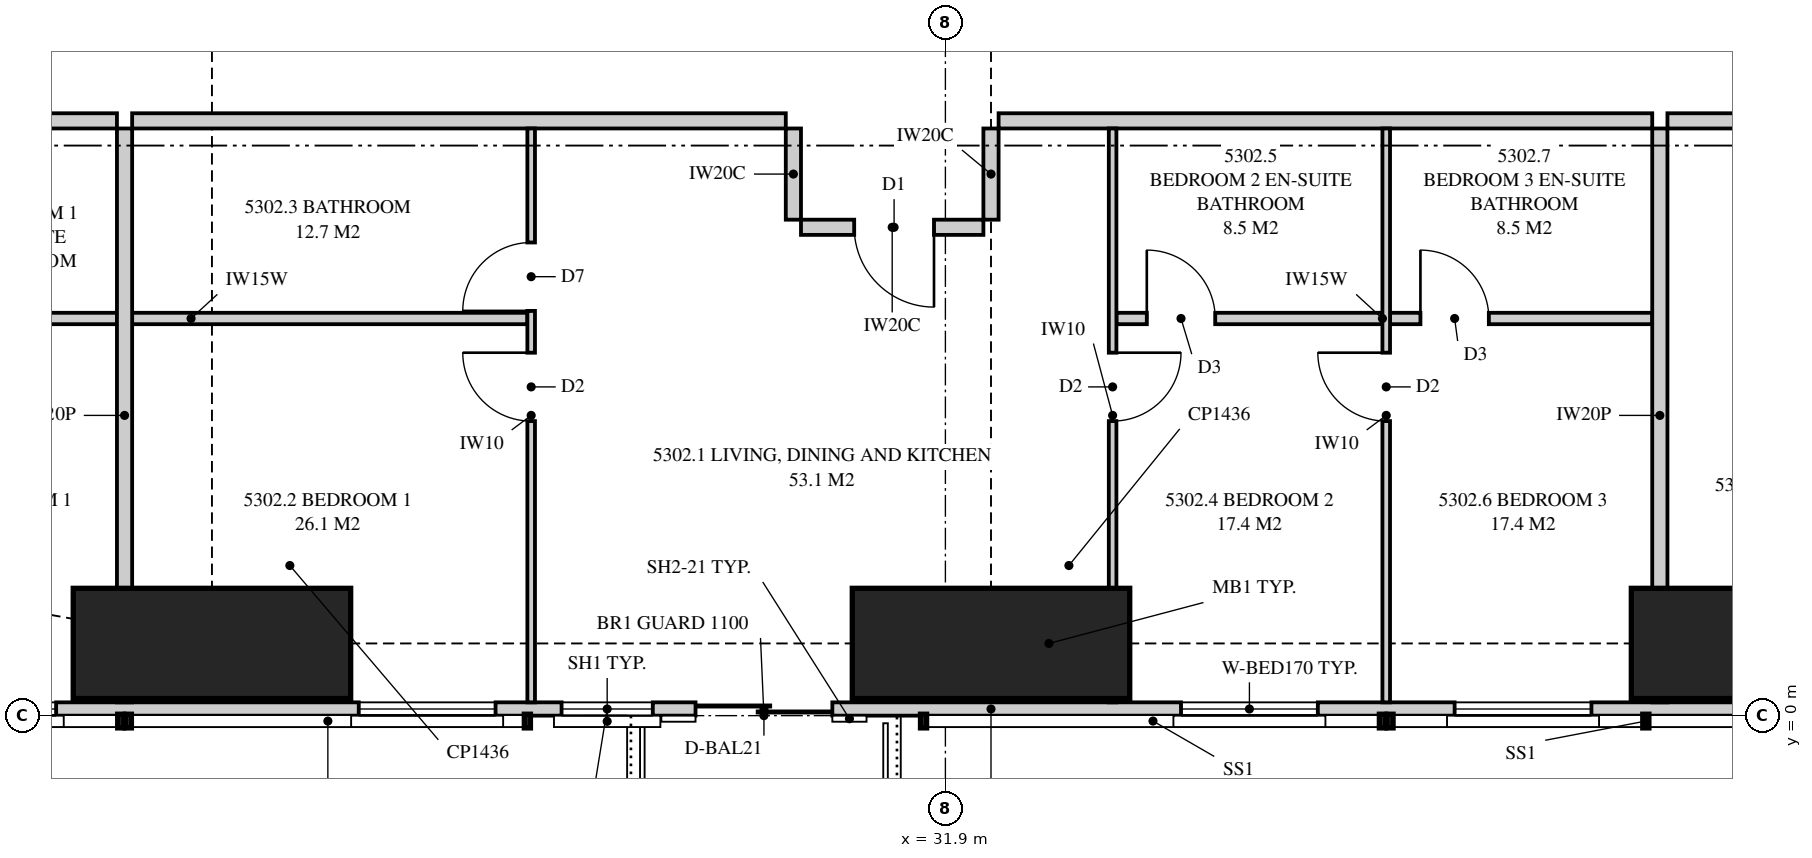
"""IFC4 building model, lengths in metres.
Left out: names, types, materials, properties, quantities, classifications, styles, units other than length and angle.
Written with IfcOpenShell. Run it as: python <this file> out.ifc"""

import sys

from ifc_helpers import new_model, si_unit, direction, frame, frame_2d, origin, origin_2d, place, context, subcontext, project, spatial, polyline, rectangle, outline, extrude, element, fill, save


model = new_model("IFC4")
c1 = context("Model", 3, precision=1e-05, world=origin(), true_north=direction((0.0, 1.0)))
c2 = subcontext(c1, "Body", "Model", "MODEL_VIEW")
j1 = project(units=[si_unit("LENGTHUNIT", "METRE"), si_unit("PLANEANGLEUNIT", "RADIAN")], contexts=[c1])
p1 = place(None, origin())
s1 = spatial("IfcSite", under=j1, at=p1, CompositionType="ELEMENT")
p2 = place(p1, origin())
s2 = spatial("IfcBuilding", under=s1, at=p2, CompositionType="ELEMENT")
p3 = place(p2, frame((0.0, 0.0, 194.55)))
s3 = spatial("IfcBuildingStorey", under=s2, at=p3, CompositionType="ELEMENT", Elevation=194.55)
for number, where, z_axis, x_axis in (
    (1, (22.25, 0.95, 0.0), (0.0, 0.0, 1.0), (0.0, 1.0, 0.0)),
    (2, (32.5, 0.95, 0.0), (0.0, 0.0, 1.0), (0.0, 1.0, 0.0)),
    (3, (42.75, 0.95, 0.0), (0.0, 0.0, 1.0), (0.0, 1.0, 0.0)),
):
    element("IfcColumn", number, at=place(p3, frame(where, z_axis=z_axis, x_axis=x_axis)), inside=s3, PredefinedType="COLUMN", context=c2, shape_type="SweptSolid", body=[
        extrude(rectangle(XDim=1.45, YDim=3.65, at=origin_2d()), origin(), (0.0, 0.0, 1.0), 3.35),
    ])
p4 = place(p3, frame((15.051, 0.087, 0.0), z_axis=(0.0, 0.0, 1.0), x_axis=(1.0, 0.0, 0.0)))
e4 = element("IfcWall", 4, at=p4, inside=s3, PredefinedType="SOLIDWALL", context=c2, shape_type="SweptSolid", body=[
    extrude(outline(polyline([(0.0, 0.0), (34.897, 0.0), (34.897, 3.11), (27.91, 3.11), (27.91, 2.15), (27.836, 2.15), (27.836, 3.11), (27.699, 3.11), (27.699, 2.15), (7.199, 2.15), (7.199, 3.11), (7.062, 3.11), (7.062, 2.15), (6.987, 2.15), (6.987, 3.11), (0.0, 3.11), (0.0, 0.0)])), frame((0.0, 0.087, 0.0), z_axis=(0.0, -1.0, 0.0), x_axis=(1.0, 0.0, 0.0)), (0.0, 0.0, 1.0), 0.175),
])
p5 = place(p4, frame((0.613, 0.0, 0.4)))
e5 = element("IfcOpeningElement", 5, at=p5, cuts=e4, PredefinedType="OPENING", context=c2, shape_type="SweptSolid", body=[
    extrude(rectangle(XDim=1.2, YDim=1.7, at=frame_2d((0.6, 0.85))), frame((0.0, 0.097, 0.0), z_axis=(0.0, -1.0, 0.0), x_axis=(1.0, 0.0, 0.0)), (0.0, 0.0, 1.0), 0.195),
])
p6 = place(p4, frame((3.349, 0.0, 0.4)))
e6 = element("IfcOpeningElement", 6, at=p6, cuts=e4, PredefinedType="OPENING", context=c2, shape_type="SweptSolid", body=[
    extrude(rectangle(XDim=1.8, YDim=1.7, at=frame_2d((0.9, 0.85))), frame((0.0, 0.097, 0.0), z_axis=(0.0, -1.0, 0.0), x_axis=(1.0, 0.0, 0.0)), (0.0, 0.0, 1.0), 0.195),
])
p7 = place(p4, frame((9.13, 0.0, 0.4)))
e7 = element("IfcOpeningElement", 7, at=p7, cuts=e4, PredefinedType="OPENING", context=c2, shape_type="SweptSolid", body=[
    extrude(rectangle(XDim=1.8, YDim=1.7, at=frame_2d((0.9, 0.85))), frame((0.0, 0.097, 0.0), z_axis=(0.0, -1.0, 0.0), x_axis=(1.0, 0.0, 0.0)), (0.0, 0.0, 1.0), 0.195),
])
p8 = place(p4, frame((13.561, 0.0, 0.0)))
e8 = element("IfcOpeningElement", 8, at=p8, cuts=e4, PredefinedType="OPENING", context=c2, shape_type="SweptSolid", body=[
    extrude(rectangle(XDim=1.8, YDim=2.1, at=frame_2d((0.9, 1.05))), frame((0.0, 0.097, 0.0), z_axis=(0.0, -1.0, 0.0), x_axis=(1.0, 0.0, 0.0)), (0.0, 0.0, 1.0), 0.195),
])
p9 = place(p4, frame((11.799, 0.0, 0.4)))
e9 = element("IfcOpeningElement", 9, at=p9, cuts=e4, PredefinedType="OPENING", context=c2, shape_type="SweptSolid", body=[
    extrude(rectangle(XDim=1.2, YDim=1.7, at=frame_2d((0.6, 0.85))), frame((0.0, 0.097, 0.0), z_axis=(0.0, -1.0, 0.0), x_axis=(1.0, 0.0, 0.0)), (0.0, 0.0, 1.0), 0.195),
])
p10 = place(p4, frame((19.949, 0.0, 0.4)))
e10 = element("IfcOpeningElement", 10, at=p10, cuts=e4, PredefinedType="OPENING", context=c2, shape_type="SweptSolid", body=[
    extrude(rectangle(XDim=1.8, YDim=1.7, at=frame_2d((0.9, 0.85))), frame((0.0, 0.097, 0.0), z_axis=(0.0, -1.0, 0.0), x_axis=(1.0, 0.0, 0.0)), (0.0, 0.0, 1.0), 0.195),
])
p11 = place(p4, frame((23.549, 0.0, 0.4)))
e11 = element("IfcOpeningElement", 11, at=p11, cuts=e4, PredefinedType="OPENING", context=c2, shape_type="SweptSolid", body=[
    extrude(rectangle(XDim=1.8, YDim=1.7, at=frame_2d((0.9, 0.85))), frame((0.0, 0.097, 0.0), z_axis=(0.0, -1.0, 0.0), x_axis=(1.0, 0.0, 0.0)), (0.0, 0.0, 1.0), 0.195),
])
p12 = place(p4, frame((29.73, 0.0, 0.4)))
e12 = element("IfcOpeningElement", 12, at=p12, cuts=e4, PredefinedType="OPENING", context=c2, shape_type="SweptSolid", body=[
    extrude(rectangle(XDim=2.4, YDim=1.7, at=frame_2d((1.2, 0.85))), frame((0.0, 0.097, 0.0), z_axis=(0.0, -1.0, 0.0), x_axis=(1.0, 0.0, 0.0)), (0.0, 0.0, 1.0), 0.195),
])
p13 = place(p3, frame((21.1, 0.175, 0.0), z_axis=(0.0, 0.0, 1.0), x_axis=(0.0, 1.0, 0.0)))
e13 = element("IfcWall", 13, at=p13, inside=s3, PredefinedType="PARTITIONING", context=c2, shape_type="SweptSolid", body=[
    extrude(outline(polyline([(0.054, 3.11), (0.0, 3.11), (0.0, 0.0), (0.529, 0.0), (0.529, 0.362), (1.021, 0.362), (1.021, 0.0), (7.55, 0.0), (7.55, 3.11), (1.903, 3.11), (1.903, 2.15), (1.021, 2.15), (1.021, 1.788), (0.529, 1.788), (0.529, 2.15), (0.054, 2.15), (0.054, 3.11)])), frame((0.0, 0.1, 0.0), z_axis=(0.0, -1.0, 0.0), x_axis=(1.0, 0.0, 0.0)), (0.0, 0.0, 1.0), 0.2),
])
p14 = place(p3, frame((17.85, 7.825, 0.0), z_axis=(0.0, 0.0, 1.0), x_axis=(1.0, 0.0, 0.0)))
e14 = element("IfcWall", 14, at=p14, inside=s3, PredefinedType="PARTITIONING", context=c2, shape_type="SweptSolid", body=[
    extrude(rectangle(XDim=3.15, YDim=0.2, at=frame_2d((1.575, 0.0))), origin(), (0.0, 0.0, 1.0), 3.11),
])
p15 = place(p14, frame((0.2, 0.0, 0.0)))
e15 = element("IfcOpeningElement", 15, at=p15, cuts=e14, PredefinedType="OPENING", context=c2, shape_type="SweptSolid", body=[
    extrude(rectangle(XDim=1.05, YDim=2.2, at=frame_2d((0.525, 1.1))), frame((0.0, 0.11, 0.0), z_axis=(0.0, -1.0, 0.0), x_axis=(1.0, 0.0, 0.0)), (0.0, 0.0, 1.0), 0.22),
])
p16 = place(p3, frame((17.55, 5.225, 0.0), z_axis=(0.0, 0.0, 1.0), x_axis=(1.0, 0.0, 0.0)))
e16 = element("IfcWall", 16, at=p16, inside=s3, PredefinedType="PLUMBINGWALL", context=c2, shape_type="SweptSolid", body=[
    extrude(rectangle(XDim=3.45, YDim=0.15, at=frame_2d((1.725, 0.0))), origin(), (0.0, 0.0, 1.0), 3.11),
])
p17 = place(p16, frame((0.4, 0.0, 0.0)))
e17 = element("IfcOpeningElement", 17, at=p17, cuts=e16, PredefinedType="OPENING", context=c2, shape_type="SweptSolid", body=[
    extrude(rectangle(XDim=0.9, YDim=2.1, at=frame_2d((0.45, 1.05))), frame((0.0, 0.085, 0.0), z_axis=(0.0, -1.0, 0.0), x_axis=(1.0, 0.0, 0.0)), (0.0, 0.0, 1.0), 0.17),
])
p18 = place(p3, frame((41.3, 0.175, 0.0), z_axis=(0.0, 0.0, 1.0), x_axis=(0.0, 1.0, 0.0)))
e18 = element("IfcWall", 18, at=p18, inside=s3, PredefinedType="PARTITIONING", context=c2, shape_type="SweptSolid", body=[
    extrude(outline(polyline([(0.529, 2.15), (0.0, 2.15), (0.0, 0.0), (0.529, 0.0), (0.529, 0.032), (1.021, 0.032), (1.021, 0.0), (7.55, 0.0), (7.55, 3.11), (1.685, 3.11), (1.685, 2.15), (1.021, 2.15), (1.021, 2.118), (0.529, 2.118), (0.529, 2.15)])), frame((0.0, 0.1, 0.0), z_axis=(0.0, -1.0, 0.0), x_axis=(1.0, 0.0, 0.0)), (0.0, 0.0, 1.0), 0.2),
])
p19 = place(p3, frame((21.2, 7.825, 0.0), z_axis=(0.0, 0.0, 1.0), x_axis=(1.0, 0.0, 0.0)))
e19 = element("IfcWall", 19, at=p19, inside=s3, PredefinedType="PARTITIONING", context=c2, shape_type="SweptSolid", body=[
    extrude(outline(polyline([(0.0, 0.0), (8.6, 0.0), (8.6, 3.11), (1.387, 3.11), (1.387, 2.541), (0.713, 2.541), (0.713, 3.11), (0.0, 3.11), (0.0, 0.0)])), frame((0.0, 0.1, 0.0), z_axis=(0.0, -1.0, 0.0), x_axis=(1.0, 0.0, 0.0)), (0.0, 0.0, 1.0), 0.2),
])
p20 = place(p3, frame((26.45, 0.175, 0.0), z_axis=(0.0, 0.0, 1.0), x_axis=(0.0, 1.0, 0.0)))
e20 = element("IfcWall", 20, at=p20, inside=s3, PredefinedType="PARTITIONING", context=c2, shape_type="SweptSolid", body=[
    extrude(outline(polyline([(0.0, 0.0), (7.55, 0.0), (7.55, 3.11), (1.635, 3.11), (1.635, 2.15), (0.0, 2.15), (0.0, 3.11), (0.0, 0.0)])), frame((0.0, 0.05, 0.0), z_axis=(0.0, -1.0, 0.0), x_axis=(1.0, 0.0, 0.0)), (0.0, 0.0, 1.0), 0.1),
])
p21 = place(p20, frame((3.7, 0.0, 0.0)))
e21 = element("IfcOpeningElement", 21, at=p21, cuts=e20, PredefinedType="OPENING", context=c2, shape_type="SweptSolid", body=[
    extrude(rectangle(XDim=0.9, YDim=2.1, at=frame_2d((0.45, 1.05))), frame((0.0, 0.06, 0.0), z_axis=(0.0, -1.0, 0.0), x_axis=(1.0, 0.0, 0.0)), (0.0, 0.0, 1.0), 0.12),
])
p22 = place(p20, frame((5.15, 0.0, 0.0)))
e22 = element("IfcOpeningElement", 22, at=p22, cuts=e20, PredefinedType="OPENING", context=c2, shape_type="SweptSolid", body=[
    extrude(rectangle(XDim=0.9, YDim=2.1, at=frame_2d((0.45, 1.05))), frame((0.0, 0.06, 0.0), z_axis=(0.0, -1.0, 0.0), x_axis=(1.0, 0.0, 0.0)), (0.0, 0.0, 1.0), 0.12),
])
p23 = place(p3, frame((34.1, 0.175, 0.0), z_axis=(0.0, 0.0, 1.0), x_axis=(0.0, 1.0, 0.0)))
e23 = element("IfcWall", 23, at=p23, inside=s3, PredefinedType="PARTITIONING", context=c2, shape_type="SweptSolid", body=[
    extrude(outline(polyline([(0.0, 0.0), (7.55, 0.0), (7.55, 3.11), (1.635, 3.11), (1.635, 2.15), (0.0, 2.15), (0.0, 3.11), (0.0, 0.0)])), frame((0.0, 0.05, 0.0), z_axis=(0.0, -1.0, 0.0), x_axis=(1.0, 0.0, 0.0)), (0.0, 0.0, 1.0), 0.1),
])
p24 = place(p23, frame((3.7, 0.0, 0.0)))
e24 = element("IfcOpeningElement", 24, at=p24, cuts=e23, PredefinedType="OPENING", context=c2, shape_type="SweptSolid", body=[
    extrude(rectangle(XDim=0.9, YDim=2.1, at=frame_2d((0.45, 1.05))), frame((0.0, 0.06, 0.0), z_axis=(0.0, -1.0, 0.0), x_axis=(1.0, 0.0, 0.0)), (0.0, 0.0, 1.0), 0.12),
])
p25 = place(p3, frame((37.7, 0.175, 0.0), z_axis=(0.0, 0.0, 1.0), x_axis=(0.0, 1.0, 0.0)))
e25 = element("IfcWall", 25, at=p25, inside=s3, PredefinedType="PARTITIONING", context=c2, shape_type="SweptSolid", body=[
    extrude(outline(polyline([(0.0, 0.0), (7.55, 0.0), (7.55, 3.11), (1.635, 3.11), (1.635, 2.15), (0.0, 2.15), (0.0, 3.11), (0.0, 0.0)])), frame((0.0, 0.05, 0.0), z_axis=(0.0, -1.0, 0.0), x_axis=(1.0, 0.0, 0.0)), (0.0, 0.0, 1.0), 0.1),
])
p26 = place(p25, frame((3.7, 0.0, 0.0)))
e26 = element("IfcOpeningElement", 26, at=p26, cuts=e25, PredefinedType="OPENING", context=c2, shape_type="SweptSolid", body=[
    extrude(rectangle(XDim=0.9, YDim=2.1, at=frame_2d((0.45, 1.05))), frame((0.0, 0.06, 0.0), z_axis=(0.0, -1.0, 0.0), x_axis=(1.0, 0.0, 0.0)), (0.0, 0.0, 1.0), 0.12),
])
p27 = place(p3, frame((21.2, 5.225, 0.0), z_axis=(0.0, 0.0, 1.0), x_axis=(1.0, 0.0, 0.0)))
e27 = element("IfcWall", 27, at=p27, inside=s3, PredefinedType="PLUMBINGWALL", context=c2, shape_type="SweptSolid", body=[
    extrude(outline(polyline([(0.0, 0.0), (5.2, 0.0), (5.2, 3.11), (1.362, 3.11), (1.362, 2.541), (0.738, 2.541), (0.738, 3.11), (0.0, 3.11), (0.0, 0.0)])), frame((0.0, 0.075, 0.0), z_axis=(0.0, -1.0, 0.0), x_axis=(1.0, 0.0, 0.0)), (0.0, 0.0, 1.0), 0.15),
])
p28 = place(p3, frame((34.15, 5.225, 0.0), z_axis=(0.0, 0.0, 1.0), x_axis=(1.0, 0.0, 0.0)))
e28 = element("IfcWall", 28, at=p28, inside=s3, PredefinedType="PLUMBINGWALL", context=c2, shape_type="SweptSolid", body=[
    extrude(rectangle(XDim=3.5, YDim=0.15, at=frame_2d((1.75, 0.0))), origin(), (0.0, 0.0, 1.0), 3.11),
])
p29 = place(p28, frame((0.4, 0.0, 0.0)))
e29 = element("IfcOpeningElement", 29, at=p29, cuts=e28, PredefinedType="OPENING", context=c2, shape_type="SweptSolid", body=[
    extrude(rectangle(XDim=0.9, YDim=2.1, at=frame_2d((0.45, 1.05))), frame((0.0, 0.085, 0.0), z_axis=(0.0, -1.0, 0.0), x_axis=(1.0, 0.0, 0.0)), (0.0, 0.0, 1.0), 0.17),
])
p30 = place(p3, frame((37.75, 5.225, 0.0), z_axis=(0.0, 0.0, 1.0), x_axis=(1.0, 0.0, 0.0)))
e30 = element("IfcWall", 30, at=p30, inside=s3, PredefinedType="PLUMBINGWALL", context=c2, shape_type="SweptSolid", body=[
    extrude(rectangle(XDim=3.45, YDim=0.15, at=frame_2d((1.725, 0.0))), origin(), (0.0, 0.0, 1.0), 3.11),
])
p31 = place(p30, frame((0.4, 0.0, 0.0)))
e31 = element("IfcOpeningElement", 31, at=p31, cuts=e30, PredefinedType="OPENING", context=c2, shape_type="SweptSolid", body=[
    extrude(rectangle(XDim=0.9, YDim=2.1, at=frame_2d((0.45, 1.05))), frame((0.0, 0.085, 0.0), z_axis=(0.0, -1.0, 0.0), x_axis=(1.0, 0.0, 0.0)), (0.0, 0.0, 1.0), 0.17),
])
p32 = place(p3, frame((41.4, 7.825, 0.0), z_axis=(0.0, 0.0, 1.0), x_axis=(1.0, 0.0, 0.0)))
e32 = element("IfcWall", 32, at=p32, inside=s3, PredefinedType="PARTITIONING", context=c2, shape_type="SweptSolid", body=[
    extrude(outline(polyline([(0.0, 0.0), (4.55, 0.0), (4.55, 3.11), (1.688, 3.11), (1.688, 2.541), (1.013, 2.541), (1.013, 3.11), (0.0, 3.11), (0.0, 0.0)])), frame((0.0, 0.1, 0.0), z_axis=(0.0, -1.0, 0.0), x_axis=(1.0, 0.0, 0.0)), (0.0, 0.0, 1.0), 0.2),
])
p33 = place(p32, frame((3.35, 0.0, 0.0)))
e33 = element("IfcOpeningElement", 33, at=p33, cuts=e32, PredefinedType="OPENING", context=c2, shape_type="SweptSolid", body=[
    extrude(rectangle(XDim=1.05, YDim=2.2, at=frame_2d((0.525, 1.1))), frame((0.0, 0.11, 0.0), z_axis=(0.0, -1.0, 0.0), x_axis=(1.0, 0.0, 0.0)), (0.0, 0.0, 1.0), 0.22),
])
p34 = place(p3, frame((32.6, 7.825, 0.0), z_axis=(0.0, 0.0, 1.0), x_axis=(1.0, 0.0, 0.0)))
e34 = element("IfcWall", 34, at=p34, inside=s3, PredefinedType="PARTITIONING", context=c2, shape_type="SweptSolid", body=[
    extrude(outline(polyline([(0.0, 0.0), (8.6, 0.0), (8.6, 3.11), (0.237, 3.11), (0.237, 2.541), (0.0, 2.541), (0.0, 3.11), (0.0, 0.0)])), frame((0.0, 0.1, 0.0), z_axis=(0.0, -1.0, 0.0), x_axis=(1.0, 0.0, 0.0)), (0.0, 0.0, 1.0), 0.2),
])
p35 = place(p3, frame((30.0, 6.425, 0.0), z_axis=(0.0, 0.0, 1.0), x_axis=(1.0, 0.0, 0.0)))
e35 = element("IfcWall", 35, at=p35, inside=s3, PredefinedType="PARTITIONING", context=c2, shape_type="SweptSolid", body=[
    extrude(outline(polyline([(0.0, 0.0), (2.4, 0.0), (2.4, 3.11), (2.4, 2.541), (2.163, 2.541), (2.163, 3.11), (0.0, 3.11), (0.0, 0.0)])), frame((0.0, 0.1, 0.0), z_axis=(0.0, -1.0, 0.0), x_axis=(1.0, 0.0, 0.0)), (0.0, 0.0, 1.0), 0.2),
])
p36 = place(p35, frame((0.7, 0.0, 0.0)))
e36 = element("IfcOpeningElement", 36, at=p36, cuts=e35, PredefinedType="OPENING", context=c2, shape_type="SweptSolid", body=[
    extrude(rectangle(XDim=1.05, YDim=2.2, at=frame_2d((0.525, 1.1))), frame((0.0, 0.11, 0.0), z_axis=(0.0, -1.0, 0.0), x_axis=(1.0, 0.0, 0.0)), (0.0, 0.0, 1.0), 0.22),
])
p37 = place(p3, frame((29.9, 7.725, 0.0), z_axis=(0.0, 0.0, 1.0), x_axis=(0.0, -1.0, 0.0)))
e37 = element("IfcWall", 37, at=p37, inside=s3, PredefinedType="PARTITIONING", context=c2, shape_type="SweptSolid", body=[
    extrude(rectangle(XDim=1.2, YDim=0.2, at=frame_2d((0.6, 0.0))), origin(), (0.0, 0.0, 1.0), 3.11),
])
p38 = place(p3, frame((32.5, 7.725, 0.0), z_axis=(0.0, 0.0, 1.0), x_axis=(0.0, -1.0, 0.0)))
e38 = element("IfcWall", 38, at=p38, inside=s3, PredefinedType="PARTITIONING", context=c2, shape_type="SweptSolid", body=[
    extrude(outline(polyline([(0.0, 0.0), (1.2, 0.0), (1.2, 3.11), (1.2, 2.541), (0.0, 2.541), (0.0, 3.11), (0.0, 0.0)])), frame((0.0, 0.1, 0.0), z_axis=(0.0, -1.0, 0.0), x_axis=(1.0, 0.0, 0.0)), (0.0, 0.0, 1.0), 0.2),
])
p39 = place(p6, origin())
e39 = element("IfcWindow", 39, at=p39, inside=s3, PartitioningType="SINGLE_PANEL", PredefinedType="WINDOW", context=c2, shape_type="SweptSolid", body=[
    extrude(rectangle(XDim=1.8, YDim=1.7, at=frame_2d((0.9, 0.85))), frame((0.0, 0.03, 0.0), z_axis=(0.0, -1.0, 0.0), x_axis=(1.0, 0.0, 0.0)), (0.0, 0.0, 1.0), 0.06),
])
fill(e6, e39)
p40 = place(p7, origin())
e40 = element("IfcWindow", 40, at=p40, inside=s3, PartitioningType="SINGLE_PANEL", PredefinedType="WINDOW", context=c2, shape_type="SweptSolid", body=[
    extrude(rectangle(XDim=1.8, YDim=1.7, at=frame_2d((0.9, 0.85))), frame((0.0, 0.03, 0.0), z_axis=(0.0, -1.0, 0.0), x_axis=(1.0, 0.0, 0.0)), (0.0, 0.0, 1.0), 0.06),
])
fill(e7, e40)
p41 = place(p8, origin())
e41 = element("IfcDoor", 41, at=p41, inside=s3, OperationType="SLIDING_TO_LEFT", PredefinedType="DOOR", context=c2, shape_type="SweptSolid", body=[
    extrude(rectangle(XDim=1.8, YDim=2.1, at=frame_2d((0.9, 1.05))), frame((0.0, 0.025, 0.0), z_axis=(0.0, -1.0, 0.0), x_axis=(1.0, 0.0, 0.0)), (0.0, 0.0, 1.0), 0.05),
])
fill(e8, e41)
p42 = place(p9, origin())
e42 = element("IfcWindow", 42, at=p42, inside=s3, PartitioningType="SINGLE_PANEL", PredefinedType="WINDOW", context=c2, shape_type="SweptSolid", body=[
    extrude(rectangle(XDim=1.2, YDim=1.7, at=frame_2d((0.6, 0.85))), frame((0.0, 0.03, 0.0), z_axis=(0.0, -1.0, 0.0), x_axis=(1.0, 0.0, 0.0)), (0.0, 0.0, 1.0), 0.06),
])
fill(e9, e42)
p43 = place(p10, origin())
e43 = element("IfcWindow", 43, at=p43, inside=s3, PartitioningType="SINGLE_PANEL", PredefinedType="WINDOW", context=c2, shape_type="SweptSolid", body=[
    extrude(rectangle(XDim=1.8, YDim=1.7, at=frame_2d((0.9, 0.85))), frame((0.0, 0.03, 0.0), z_axis=(0.0, -1.0, 0.0), x_axis=(1.0, 0.0, 0.0)), (0.0, 0.0, 1.0), 0.06),
])
fill(e10, e43)
p44 = place(p11, origin())
e44 = element("IfcWindow", 44, at=p44, inside=s3, PartitioningType="SINGLE_PANEL", PredefinedType="WINDOW", context=c2, shape_type="SweptSolid", body=[
    extrude(rectangle(XDim=1.8, YDim=1.7, at=frame_2d((0.9, 0.85))), frame((0.0, 0.03, 0.0), z_axis=(0.0, -1.0, 0.0), x_axis=(1.0, 0.0, 0.0)), (0.0, 0.0, 1.0), 0.06),
])
fill(e11, e44)
p45 = place(p36, frame((1.05, 0.0, 0.0), z_axis=(0.0, 0.0, 1.0), x_axis=(-1.0, 0.0, 0.0)))
e45 = element("IfcDoor", 45, at=p45, inside=s3, OperationType="SINGLE_SWING_LEFT", PredefinedType="DOOR", context=c2, shape_type="SweptSolid", body=[
    extrude(rectangle(XDim=1.05, YDim=2.2, at=frame_2d((0.525, 1.1))), frame((0.0, 0.025, 0.0), z_axis=(0.0, -1.0, 0.0), x_axis=(1.0, 0.0, 0.0)), (0.0, 0.0, 1.0), 0.05),
])
fill(e36, e45)
p46 = place(p21, origin())
e46 = element("IfcDoor", 46, at=p46, inside=s3, OperationType="SINGLE_SWING_RIGHT", PredefinedType="DOOR", context=c2, shape_type="SweptSolid", body=[
    extrude(rectangle(XDim=0.9, YDim=2.1, at=frame_2d((0.45, 1.05))), frame((0.0, 0.025, 0.0), z_axis=(0.0, -1.0, 0.0), x_axis=(1.0, 0.0, 0.0)), (0.0, 0.0, 1.0), 0.05),
])
fill(e21, e46)
p47 = place(p22, origin())
e47 = element("IfcDoor", 47, at=p47, inside=s3, OperationType="SINGLE_SWING_LEFT", PredefinedType="DOOR", context=c2, shape_type="SweptSolid", body=[
    extrude(rectangle(XDim=0.9, YDim=2.1, at=frame_2d((0.45, 1.05))), frame((0.0, 0.025, 0.0), z_axis=(0.0, -1.0, 0.0), x_axis=(1.0, 0.0, 0.0)), (0.0, 0.0, 1.0), 0.05),
])
fill(e22, e47)
p48 = place(p24, frame((0.9, 0.0, 0.0), z_axis=(0.0, 0.0, 1.0), x_axis=(-1.0, 0.0, 0.0)))
e48 = element("IfcDoor", 48, at=p48, inside=s3, OperationType="SINGLE_SWING_LEFT", PredefinedType="DOOR", context=c2, shape_type="SweptSolid", body=[
    extrude(rectangle(XDim=0.9, YDim=2.1, at=frame_2d((0.45, 1.05))), frame((0.0, 0.025, 0.0), z_axis=(0.0, -1.0, 0.0), x_axis=(1.0, 0.0, 0.0)), (0.0, 0.0, 1.0), 0.05),
])
fill(e24, e48)
p49 = place(p29, origin())
e49 = element("IfcDoor", 49, at=p49, inside=s3, OperationType="SINGLE_SWING_LEFT", PredefinedType="DOOR", context=c2, shape_type="SweptSolid", body=[
    extrude(rectangle(XDim=0.9, YDim=2.1, at=frame_2d((0.45, 1.05))), frame((0.0, 0.025, 0.0), z_axis=(0.0, -1.0, 0.0), x_axis=(1.0, 0.0, 0.0)), (0.0, 0.0, 1.0), 0.05),
])
fill(e29, e49)
p50 = place(p26, origin())
e50 = element("IfcDoor", 50, at=p50, inside=s3, OperationType="SINGLE_SWING_RIGHT", PredefinedType="DOOR", context=c2, shape_type="SweptSolid", body=[
    extrude(rectangle(XDim=0.9, YDim=2.1, at=frame_2d((0.45, 1.05))), frame((0.0, 0.025, 0.0), z_axis=(0.0, -1.0, 0.0), x_axis=(1.0, 0.0, 0.0)), (0.0, 0.0, 1.0), 0.05),
])
fill(e26, e50)
p51 = place(p31, origin())
e51 = element("IfcDoor", 51, at=p51, inside=s3, OperationType="SINGLE_SWING_LEFT", PredefinedType="DOOR", context=c2, shape_type="SweptSolid", body=[
    extrude(rectangle(XDim=0.9, YDim=2.1, at=frame_2d((0.45, 1.05))), frame((0.0, 0.025, 0.0), z_axis=(0.0, -1.0, 0.0), x_axis=(1.0, 0.0, 0.0)), (0.0, 0.0, 1.0), 0.05),
])
fill(e31, e51)
save(model, sys.argv[1])
